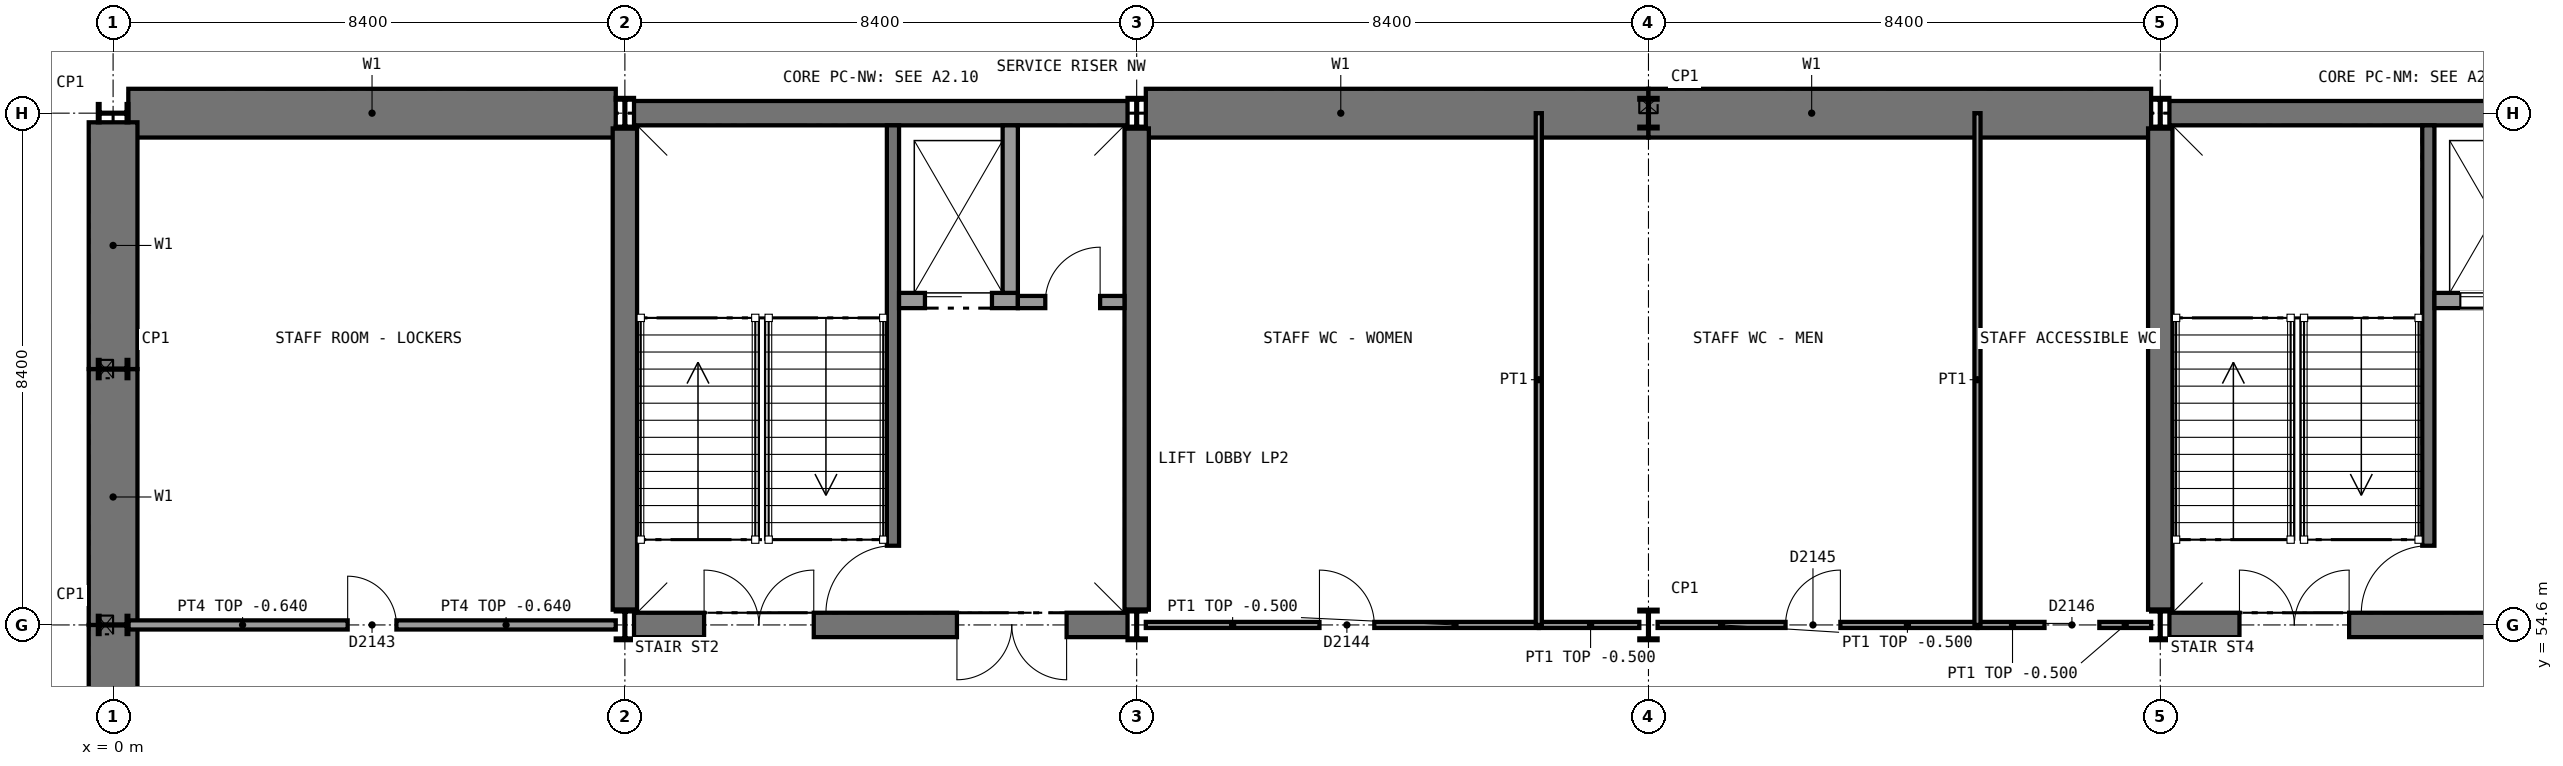
"""IFC4 building model, lengths in metres.
Left out: names, types, materials, properties, quantities, classifications, styles, units other than length and angle.
Written with IfcOpenShell. Run it as: python <this file> out.ifc"""

import sys

from ifc_helpers import new_model, si_unit, direction, frame, frame_2d, origin, origin_2d, place, context, subcontext, project, spatial, rectangle, i_section, extrude, element, fill, save


model = new_model("IFC4")
c1 = context("Model", 3, precision=1e-05, world=origin(), true_north=direction((0.0, 1.0)))
c2 = subcontext(c1, "Body", "Model", "MODEL_VIEW")
j1 = project(units=[si_unit("LENGTHUNIT", "METRE"), si_unit("PLANEANGLEUNIT", "RADIAN")], contexts=[c1])
p1 = place(None, origin())
s1 = spatial("IfcSite", under=j1, at=p1, CompositionType="ELEMENT")
p2 = place(p1, origin())
s2 = spatial("IfcBuilding", under=s1, at=p2, CompositionType="ELEMENT")
p3 = place(p2, frame((0.0, 0.0, -4.9)))
s3 = spatial("IfcBuildingStorey", under=s2, at=p3, CompositionType="ELEMENT", Elevation=-4.9)
p4 = place(p3, frame((0.25, 63.0, 0.0), z_axis=(0.0, 0.0, 1.0), x_axis=(1.0, 0.0, 0.0)))
e1 = element("IfcWall", 1, at=p4, inside=s3, PredefinedType="SOLIDWALL", context=c2, shape_type="SweptSolid", body=[
    extrude(rectangle(XDim=8.0, YDim=0.8, at=frame_2d((4.0, 0.0))), origin(), (0.0, 0.0, 1.0), 4.75),
])
p5 = place(p3, frame((16.95, 63.0, 0.0), z_axis=(0.0, 0.0, 1.0), x_axis=(1.0, 0.0, 0.0)))
e2 = element("IfcWall", 2, at=p5, inside=s3, PredefinedType="SOLIDWALL", context=c2, shape_type="SweptSolid", body=[
    extrude(rectangle(XDim=8.25, YDim=0.8, at=frame_2d((4.125, 0.0))), origin(), (0.0, 0.0, 1.0), 4.75),
])
p6 = place(p3, frame((25.2, 63.0, 0.0), z_axis=(0.0, 0.0, 1.0), x_axis=(1.0, 0.0, 0.0)))
e3 = element("IfcWall", 3, at=p6, inside=s3, PredefinedType="SOLIDWALL", context=c2, shape_type="SweptSolid", body=[
    extrude(rectangle(XDim=8.25, YDim=0.8, at=frame_2d((4.125, 0.0))), origin(), (0.0, 0.0, 1.0), 4.75),
])
p7 = place(p3, frame((0.0, 50.4, 0.0), z_axis=(0.0, 0.0, 1.0), x_axis=(0.0, 1.0, 0.0)))
e4 = element("IfcWall", 4, at=p7, inside=s3, PredefinedType="SOLIDWALL", context=c2, shape_type="SweptSolid", body=[
    extrude(rectangle(XDim=4.2, YDim=0.8, at=frame_2d((2.1, 0.0))), origin(), (0.0, 0.0, 1.0), 4.75),
])
p8 = place(p3, frame((0.0, 54.6, 0.0), z_axis=(0.0, 0.0, 1.0), x_axis=(0.0, 1.0, 0.0)))
e5 = element("IfcWall", 5, at=p8, inside=s3, PredefinedType="SOLIDWALL", context=c2, shape_type="SweptSolid", body=[
    extrude(rectangle(XDim=4.2, YDim=0.8, at=frame_2d((2.1, 0.0))), origin(), (0.0, 0.0, 1.0), 4.75),
])
p9 = place(p3, frame((0.0, 58.8, 0.0), z_axis=(0.0, 0.0, 1.0), x_axis=(0.0, 1.0, 0.0)))
e6 = element("IfcWall", 6, at=p9, inside=s3, PredefinedType="SOLIDWALL", context=c2, shape_type="SweptSolid", body=[
    extrude(rectangle(XDim=4.05, YDim=0.8, at=frame_2d((2.025, 0.0))), origin(), (0.0, 0.0, 1.0), 4.75),
])
p10 = place(p3, frame((8.55, 63.0, 0.0), z_axis=(0.0, 0.0, 1.0), x_axis=(1.0, 0.0, 0.0)))
e7 = element("IfcWall", 7, at=p10, inside=s3, PredefinedType="SHEAR", context=c2, shape_type="SweptSolid", body=[
    extrude(rectangle(XDim=8.1, YDim=0.4, at=frame_2d((4.05, 0.0))), origin(), (0.0, 0.0, 1.0), 4.75),
])
p11 = place(p3, frame((8.55, 54.6, 0.0), z_axis=(0.0, 0.0, 1.0), x_axis=(1.0, 0.0, 0.0)))
e8 = element("IfcWall", 8, at=p11, inside=s3, PredefinedType="SHEAR", context=c2, shape_type="SweptSolid", body=[
    extrude(rectangle(XDim=8.1, YDim=0.4, at=frame_2d((4.05, 0.0))), origin(), (0.0, 0.0, 1.0), 4.75),
])
p12 = place(p11, frame((1.15, 0.0, 0.0)))
e9 = element("IfcOpeningElement", 9, at=p12, cuts=e8, PredefinedType="OPENING", context=c2, shape_type="SweptSolid", body=[
    extrude(rectangle(XDim=1.8, YDim=2.1, at=frame_2d((0.9, 1.05))), frame((0.0, 0.21, 0.0), z_axis=(0.0, -1.0, 0.0), x_axis=(1.0, 0.0, 0.0)), (0.0, 0.0, 1.0), 0.42),
])
p13 = place(p11, frame((5.3, 0.0, 0.0)))
e10 = element("IfcOpeningElement", 10, at=p13, cuts=e8, PredefinedType="OPENING", context=c2, shape_type="SweptSolid", body=[
    extrude(rectangle(XDim=1.8, YDim=2.1, at=frame_2d((0.9, 1.05))), frame((0.0, 0.21, 0.0), z_axis=(0.0, -1.0, 0.0), x_axis=(1.0, 0.0, 0.0)), (0.0, 0.0, 1.0), 0.42),
])
for number, where, z_axis, x_axis in (
    (11, (8.4, 54.85, 0.0), (0.0, 0.0, 1.0), (0.0, 1.0, 0.0)),
    (12, (16.8, 54.85, 0.0), (0.0, 0.0, 1.0), (0.0, 1.0, 0.0)),
):
    element("IfcWall", number, at=place(p3, frame(where, z_axis=z_axis, x_axis=x_axis)), inside=s3, PredefinedType="SHEAR", context=c2, shape_type="SweptSolid", body=[
        extrude(rectangle(XDim=7.9, YDim=0.4, at=frame_2d((3.95, 0.0))), origin(), (0.0, 0.0, 1.0), 4.75),
    ])
p14 = place(p3, frame((33.75, 63.0, 0.0), z_axis=(0.0, 0.0, 1.0), x_axis=(1.0, 0.0, 0.0)))
e13 = element("IfcWall", 13, at=p14, inside=s3, PredefinedType="SHEAR", context=c2, shape_type="SweptSolid", body=[
    extrude(rectangle(XDim=8.1, YDim=0.4, at=frame_2d((4.05, 0.0))), origin(), (0.0, 0.0, 1.0), 4.75),
])
p15 = place(p3, frame((33.75, 54.6, 0.0), z_axis=(0.0, 0.0, 1.0), x_axis=(1.0, 0.0, 0.0)))
e14 = element("IfcWall", 14, at=p15, inside=s3, PredefinedType="SHEAR", context=c2, shape_type="SweptSolid", body=[
    extrude(rectangle(XDim=8.1, YDim=0.4, at=frame_2d((4.05, 0.0))), origin(), (0.0, 0.0, 1.0), 4.75),
])
p16 = place(p15, frame((1.15, 0.0, 0.0)))
e15 = element("IfcOpeningElement", 15, at=p16, cuts=e14, PredefinedType="OPENING", context=c2, shape_type="SweptSolid", body=[
    extrude(rectangle(XDim=1.8, YDim=2.1, at=frame_2d((0.9, 1.05))), frame((0.0, 0.21, 0.0), z_axis=(0.0, -1.0, 0.0), x_axis=(1.0, 0.0, 0.0)), (0.0, 0.0, 1.0), 0.42),
])
p17 = place(p15, frame((5.3, 0.0, 0.0)))
e16 = element("IfcOpeningElement", 16, at=p17, cuts=e14, PredefinedType="OPENING", context=c2, shape_type="SweptSolid", body=[
    extrude(rectangle(XDim=1.8, YDim=2.1, at=frame_2d((0.9, 1.05))), frame((0.0, 0.21, 0.0), z_axis=(0.0, -1.0, 0.0), x_axis=(1.0, 0.0, 0.0)), (0.0, 0.0, 1.0), 0.42),
])
p18 = place(p3, frame((33.6, 54.85, 0.0), z_axis=(0.0, 0.0, 1.0), x_axis=(0.0, 1.0, 0.0)))
e17 = element("IfcWall", 17, at=p18, inside=s3, PredefinedType="SHEAR", context=c2, shape_type="SweptSolid", body=[
    extrude(rectangle(XDim=7.9, YDim=0.4, at=frame_2d((3.95, 0.0))), origin(), (0.0, 0.0, 1.0), 4.75),
])
for number, where, z_axis, x_axis in (
    (18, (0.0, 54.6, 0.0), (0.0, 0.0, 1.0), (0.0, 1.0, 0.0)),
    (19, (0.0, 58.8, 0.0), (0.0, 0.0, 1.0), (0.0, 1.0, 0.0)),
    (20, (0.0, 63.0, 0.0), (0.0, 0.0, 1.0), (0.0, 1.0, 0.0)),
    (21, (8.4, 54.6, 0.0), (0.0, 0.0, 1.0), (1.0, 0.0, 0.0)),
    (22, (8.4, 63.0, 0.0), (0.0, 0.0, 1.0), (1.0, 0.0, 0.0)),
    (23, (16.8, 54.6, 0.0), (0.0, 0.0, 1.0), (1.0, 0.0, 0.0)),
    (24, (16.8, 63.0, 0.0), (0.0, 0.0, 1.0), (1.0, 0.0, 0.0)),
    (25, (25.2, 54.6, 0.0), (0.0, 0.0, 1.0), (1.0, 0.0, 0.0)),
    (26, (25.2, 63.0, 0.0), (0.0, 0.0, 1.0), (1.0, 0.0, 0.0)),
    (27, (33.6, 54.6, 0.0), (0.0, 0.0, 1.0), (1.0, 0.0, 0.0)),
    (28, (33.6, 63.0, 0.0), (0.0, 0.0, 1.0), (1.0, 0.0, 0.0)),
):
    element("IfcColumn", number, at=place(p3, frame(where, z_axis=z_axis, x_axis=x_axis)), inside=s3, PredefinedType="COLUMN", context=c2, shape_type="SweptSolid", body=[
        extrude(i_section(OverallWidth=0.3, OverallDepth=0.5, WebThickness=0.014, FlangeThickness=0.028, FilletRadius=0.027, at=origin_2d()), origin(), (0.0, 0.0, 1.0), 4.9),
    ])
p19 = place(p3, frame((0.25, 54.6, 0.0), z_axis=(0.0, 0.0, 1.0), x_axis=(1.0, 0.0, 0.0)))
e29 = element("IfcWall", 29, at=p19, inside=s3, PredefinedType="SOLIDWALL", context=c2, shape_type="SweptSolid", body=[
    extrude(rectangle(XDim=8.0, YDim=0.15, at=frame_2d((4.0, 0.0))), origin(), (0.0, 0.0, 1.0), 4.26),
])
p20 = place(p19, frame((3.6, 0.0, 0.0)))
e30 = element("IfcOpeningElement", 30, at=p20, cuts=e29, PredefinedType="OPENING", context=c2, shape_type="SweptSolid", body=[
    extrude(rectangle(XDim=0.8, YDim=2.1, at=frame_2d((0.4, 1.05))), frame((0.0, 0.085, 0.0), z_axis=(0.0, -1.0, 0.0), x_axis=(1.0, 0.0, 0.0)), (0.0, 0.0, 1.0), 0.17),
])
p21 = place(p3, frame((16.95, 54.6, 0.0), z_axis=(0.0, 0.0, 1.0), x_axis=(1.0, 0.0, 0.0)))
e31 = element("IfcWall", 31, at=p21, inside=s3, PredefinedType="PARTITIONING", context=c2, shape_type="SweptSolid", body=[
    extrude(rectangle(XDim=6.45, YDim=0.1, at=frame_2d((3.225, 0.0))), origin(), (0.0, 0.0, 1.0), 4.4),
])
p22 = place(p21, frame((2.85, 0.0, 0.0)))
e32 = element("IfcOpeningElement", 32, at=p22, cuts=e31, PredefinedType="OPENING", context=c2, shape_type="SweptSolid", body=[
    extrude(rectangle(XDim=0.9, YDim=2.1, at=frame_2d((0.45, 1.05))), frame((0.0, 0.06, 0.0), z_axis=(0.0, -1.0, 0.0), x_axis=(1.0, 0.0, 0.0)), (0.0, 0.0, 1.0), 0.12),
])
p23 = place(p3, frame((23.4, 54.6, 0.0), z_axis=(0.0, 0.0, 1.0), x_axis=(1.0, 0.0, 0.0)))
e33 = element("IfcWall", 33, at=p23, inside=s3, PredefinedType="PARTITIONING", context=c2, shape_type="SweptSolid", body=[
    extrude(rectangle(XDim=1.65, YDim=0.1, at=frame_2d((0.825, 0.0))), origin(), (0.0, 0.0, 1.0), 4.4),
])
p24 = place(p3, frame((25.35, 54.6, 0.0), z_axis=(0.0, 0.0, 1.0), x_axis=(1.0, 0.0, 0.0)))
e34 = element("IfcWall", 34, at=p24, inside=s3, PredefinedType="PARTITIONING", context=c2, shape_type="SweptSolid", body=[
    extrude(rectangle(XDim=5.25, YDim=0.1, at=frame_2d((2.625, 0.0))), origin(), (0.0, 0.0, 1.0), 4.4),
])
p25 = place(p24, frame((2.1, 0.0, 0.0)))
e35 = element("IfcOpeningElement", 35, at=p25, cuts=e34, PredefinedType="OPENING", context=c2, shape_type="SweptSolid", body=[
    extrude(rectangle(XDim=0.9, YDim=2.1, at=frame_2d((0.45, 1.05))), frame((0.0, 0.06, 0.0), z_axis=(0.0, -1.0, 0.0), x_axis=(1.0, 0.0, 0.0)), (0.0, 0.0, 1.0), 0.12),
])
p26 = place(p3, frame((30.6, 54.6, 0.0), z_axis=(0.0, 0.0, 1.0), x_axis=(1.0, 0.0, 0.0)))
e36 = element("IfcWall", 36, at=p26, inside=s3, PredefinedType="PARTITIONING", context=c2, shape_type="SweptSolid", body=[
    extrude(rectangle(XDim=2.85, YDim=0.1, at=frame_2d((1.425, 0.0))), origin(), (0.0, 0.0, 1.0), 4.4),
])
p27 = place(p26, frame((1.1, 0.0, 0.0)))
e37 = element("IfcOpeningElement", 37, at=p27, cuts=e36, PredefinedType="OPENING", context=c2, shape_type="SweptSolid", body=[
    extrude(rectangle(XDim=0.9, YDim=2.1, at=frame_2d((0.45, 1.05))), frame((0.0, 0.06, 0.0), z_axis=(0.0, -1.0, 0.0), x_axis=(1.0, 0.0, 0.0)), (0.0, 0.0, 1.0), 0.12),
])
for number, where, z_axis, x_axis in (
    (38, (23.4, 54.6, 0.0), (0.0, 0.0, 1.0), (0.0, 1.0, 0.0)),
    (39, (30.6, 54.6, 0.0), (0.0, 0.0, 1.0), (0.0, 1.0, 0.0)),
):
    element("IfcWall", number, at=place(p3, frame(where, z_axis=z_axis, x_axis=x_axis)), inside=s3, PredefinedType="PARTITIONING", context=c2, shape_type="SweptSolid", body=[
        extrude(rectangle(XDim=8.4, YDim=0.1, at=frame_2d((4.2, 0.0))), origin(), (0.0, 0.0, 1.0), 4.75),
    ])
p28 = place(p3, frame((12.8, 62.8, 0.0), z_axis=(0.0, 0.0, 1.0), x_axis=(0.0, -1.0, 0.0)))
e40 = element("IfcWall", 40, at=p28, inside=s3, PredefinedType="SHEAR", context=c2, shape_type="SweptSolid", body=[
    extrude(rectangle(XDim=8.0, YDim=0.2, at=frame_2d((4.0, 0.0))), origin(), (0.0, 0.0, 1.0), 4.75),
])
p29 = place(p28, frame((6.9, 0.0, 0.0)))
e41 = element("IfcOpeningElement", 41, at=p29, cuts=e40, PredefinedType="OPENING", context=c2, shape_type="SweptSolid", body=[
    extrude(rectangle(XDim=1.11, YDim=2.1, at=frame_2d((0.555, 1.05))), frame((0.0, 0.11, 0.0), z_axis=(0.0, -1.0, 0.0), x_axis=(1.0, 0.0, 0.0)), (0.0, 0.0, 1.0), 0.22),
])
p30 = place(p3, frame((12.9, 59.925, 0.0), z_axis=(0.0, 0.0, 1.0), x_axis=(1.0, 0.0, 0.0)))
e42 = element("IfcWall", 42, at=p30, inside=s3, PredefinedType="SOLIDWALL", context=c2, shape_type="SweptSolid", body=[
    extrude(rectangle(XDim=1.95, YDim=0.25, at=frame_2d((0.975, 0.0))), origin(), (0.0, 0.0, 1.0), 4.9),
])
p31 = place(p30, frame((0.425, 0.0, 0.0)))
e43 = element("IfcOpeningElement", 43, at=p31, cuts=e42, PredefinedType="OPENING", context=c2, shape_type="SweptSolid", body=[
    extrude(rectangle(XDim=1.1, YDim=2.1, at=frame_2d((0.55, 1.05))), frame((0.0, 0.135, 0.0), z_axis=(0.0, -1.0, 0.0), x_axis=(1.0, 0.0, 0.0)), (0.0, 0.0, 1.0), 0.27),
])
p32 = place(p3, frame((14.725, 62.8, 0.0), z_axis=(0.0, 0.0, 1.0), x_axis=(0.0, -1.0, 0.0)))
e44 = element("IfcWall", 44, at=p32, inside=s3, PredefinedType="SOLIDWALL", context=c2, shape_type="SweptSolid", body=[
    extrude(rectangle(XDim=2.75, YDim=0.25, at=frame_2d((1.375, 0.0))), origin(), (0.0, 0.0, 1.0), 4.9),
])
p33 = place(p3, frame((14.85, 59.9, 0.0), z_axis=(0.0, 0.0, 1.0), x_axis=(1.0, 0.0, 0.0)))
e45 = element("IfcWall", 45, at=p33, inside=s3, PredefinedType="PARTITIONING", context=c2, shape_type="SweptSolid", body=[
    extrude(rectangle(XDim=1.75, YDim=0.2, at=frame_2d((0.875, 0.0))), origin(), (0.0, 0.0, 1.0), 4.75),
])
p34 = place(p33, frame((0.45, 0.0, 0.0)))
e46 = element("IfcOpeningElement", 46, at=p34, cuts=e45, PredefinedType="OPENING", context=c2, shape_type="SweptSolid", body=[
    extrude(rectangle(XDim=0.9, YDim=2.1, at=frame_2d((0.45, 1.05))), frame((0.0, 0.11, 0.0), z_axis=(0.0, -1.0, 0.0), x_axis=(1.0, 0.0, 0.0)), (0.0, 0.0, 1.0), 0.22),
])
p35 = place(p3, frame((38.0, 62.8, 0.0), z_axis=(0.0, 0.0, 1.0), x_axis=(0.0, -1.0, 0.0)))
e47 = element("IfcWall", 47, at=p35, inside=s3, PredefinedType="SHEAR", context=c2, shape_type="SweptSolid", body=[
    extrude(rectangle(XDim=8.0, YDim=0.2, at=frame_2d((4.0, 0.0))), origin(), (0.0, 0.0, 1.0), 4.75),
])
p36 = place(p35, frame((6.9, 0.0, 0.0)))
e48 = element("IfcOpeningElement", 48, at=p36, cuts=e47, PredefinedType="OPENING", context=c2, shape_type="SweptSolid", body=[
    extrude(rectangle(XDim=1.11, YDim=2.1, at=frame_2d((0.555, 1.05))), frame((0.0, 0.11, 0.0), z_axis=(0.0, -1.0, 0.0), x_axis=(1.0, 0.0, 0.0)), (0.0, 0.0, 1.0), 0.22),
])
p37 = place(p3, frame((38.1, 59.925, 0.0), z_axis=(0.0, 0.0, 1.0), x_axis=(1.0, 0.0, 0.0)))
e49 = element("IfcWall", 49, at=p37, inside=s3, PredefinedType="SOLIDWALL", context=c2, shape_type="SweptSolid", body=[
    extrude(rectangle(XDim=1.95, YDim=0.25, at=frame_2d((0.975, 0.0))), origin(), (0.0, 0.0, 1.0), 4.9),
])
p38 = place(p37, frame((0.425, 0.0, 0.0)))
e50 = element("IfcOpeningElement", 50, at=p38, cuts=e49, PredefinedType="OPENING", context=c2, shape_type="SweptSolid", body=[
    extrude(rectangle(XDim=1.1, YDim=2.1, at=frame_2d((0.55, 1.05))), frame((0.0, 0.135, 0.0), z_axis=(0.0, -1.0, 0.0), x_axis=(1.0, 0.0, 0.0)), (0.0, 0.0, 1.0), 0.27),
])
p39 = place(p20, origin())
e51 = element("IfcDoor", 51, at=p39, inside=s3, OperationType="SINGLE_SWING_LEFT", PredefinedType="DOOR", context=c2, shape_type="SweptSolid", body=[
    extrude(rectangle(XDim=0.8, YDim=2.1, at=frame_2d((0.4, 1.05))), frame((0.0, 0.025, 0.0), z_axis=(0.0, -1.0, 0.0), x_axis=(1.0, 0.0, 0.0)), (0.0, 0.0, 1.0), 0.05),
])
fill(e30, e51)
p40 = place(p22, origin())
e52 = element("IfcDoor", 52, at=p40, inside=s3, OperationType="SINGLE_SWING_LEFT", PredefinedType="DOOR", context=c2, shape_type="SweptSolid", body=[
    extrude(rectangle(XDim=0.9, YDim=2.1, at=frame_2d((0.45, 1.05))), frame((0.0, 0.025, 0.0), z_axis=(0.0, -1.0, 0.0), x_axis=(1.0, 0.0, 0.0)), (0.0, 0.0, 1.0), 0.05),
])
fill(e32, e52)
p41 = place(p25, origin())
e53 = element("IfcDoor", 53, at=p41, inside=s3, OperationType="SINGLE_SWING_RIGHT", PredefinedType="DOOR", context=c2, shape_type="SweptSolid", body=[
    extrude(rectangle(XDim=0.9, YDim=2.1, at=frame_2d((0.45, 1.05))), frame((0.0, 0.025, 0.0), z_axis=(0.0, -1.0, 0.0), x_axis=(1.0, 0.0, 0.0)), (0.0, 0.0, 1.0), 0.05),
])
fill(e35, e53)
p42 = place(p27, frame((0.9, 0.0, 0.0), z_axis=(0.0, 0.0, 1.0), x_axis=(-1.0, 0.0, 0.0)))
e54 = element("IfcDoor", 54, at=p42, inside=s3, OperationType="SLIDING_TO_RIGHT", PredefinedType="DOOR", context=c2, shape_type="SweptSolid", body=[
    extrude(rectangle(XDim=0.9, YDim=2.1, at=frame_2d((0.45, 1.05))), frame((0.0, 0.025, 0.0), z_axis=(0.0, -1.0, 0.0), x_axis=(1.0, 0.0, 0.0)), (0.0, 0.0, 1.0), 0.05),
])
fill(e37, e54)
p43 = place(p29, frame((1.1, 0.0, 0.0), z_axis=(0.0, 0.0, 1.0), x_axis=(-1.0, 0.0, 0.0)))
e55 = element("IfcDoor", 55, at=p43, inside=s3, OperationType="SINGLE_SWING_LEFT", PredefinedType="DOOR", context=c2, shape_type="SweptSolid", body=[
    extrude(rectangle(XDim=1.1, YDim=2.1, at=frame_2d((0.55, 1.05))), frame((0.0, 0.025, 0.0), z_axis=(0.0, -1.0, 0.0), x_axis=(1.0, 0.0, 0.0)), (0.0, 0.0, 1.0), 0.05),
])
fill(e41, e55)
p44 = place(p31, frame((1.1, 0.0, 0.0), z_axis=(0.0, 0.0, 1.0), x_axis=(-1.0, 0.0, 0.0)))
e56 = element("IfcDoor", 56, at=p44, inside=s3, OperationType="SLIDING_TO_RIGHT", PredefinedType="DOOR", context=c2, shape_type="SweptSolid", body=[
    extrude(rectangle(XDim=1.1, YDim=2.1, at=frame_2d((0.55, 1.05))), frame((0.0, 0.025, 0.0), z_axis=(0.0, -1.0, 0.0), x_axis=(1.0, 0.0, 0.0)), (0.0, 0.0, 1.0), 0.05),
])
fill(e43, e56)
p45 = place(p34, origin())
e57 = element("IfcDoor", 57, at=p45, inside=s3, OperationType="SINGLE_SWING_RIGHT", PredefinedType="DOOR", context=c2, shape_type="SweptSolid", body=[
    extrude(rectangle(XDim=0.9, YDim=2.1, at=frame_2d((0.45, 1.05))), frame((0.0, 0.025, 0.0), z_axis=(0.0, -1.0, 0.0), x_axis=(1.0, 0.0, 0.0)), (0.0, 0.0, 1.0), 0.05),
])
fill(e46, e57)
p46 = place(p12, origin())
e58 = element("IfcDoor", 58, at=p46, inside=s3, OperationType="DOUBLE_DOOR_SINGLE_SWING", PredefinedType="DOOR", context=c2, shape_type="SweptSolid", body=[
    extrude(rectangle(XDim=1.8, YDim=2.1, at=frame_2d((0.9, 1.05))), frame((0.0, 0.025, 0.0), z_axis=(0.0, -1.0, 0.0), x_axis=(1.0, 0.0, 0.0)), (0.0, 0.0, 1.0), 0.05),
])
fill(e9, e58)
p47 = place(p13, frame((1.8, 0.0, 0.0), z_axis=(0.0, 0.0, 1.0), x_axis=(-1.0, 0.0, 0.0)))
e59 = element("IfcDoor", 59, at=p47, inside=s3, OperationType="DOUBLE_DOOR_SINGLE_SWING", PredefinedType="DOOR", context=c2, shape_type="SweptSolid", body=[
    extrude(rectangle(XDim=1.8, YDim=2.1, at=frame_2d((0.9, 1.05))), frame((0.0, 0.025, 0.0), z_axis=(0.0, -1.0, 0.0), x_axis=(1.0, 0.0, 0.0)), (0.0, 0.0, 1.0), 0.05),
])
fill(e10, e59)
p48 = place(p36, frame((1.1, 0.0, 0.0), z_axis=(0.0, 0.0, 1.0), x_axis=(-1.0, 0.0, 0.0)))
e60 = element("IfcDoor", 60, at=p48, inside=s3, OperationType="SINGLE_SWING_LEFT", PredefinedType="DOOR", context=c2, shape_type="SweptSolid", body=[
    extrude(rectangle(XDim=1.1, YDim=2.1, at=frame_2d((0.55, 1.05))), frame((0.0, 0.025, 0.0), z_axis=(0.0, -1.0, 0.0), x_axis=(1.0, 0.0, 0.0)), (0.0, 0.0, 1.0), 0.05),
])
fill(e48, e60)
p49 = place(p38, frame((1.1, 0.0, 0.0), z_axis=(0.0, 0.0, 1.0), x_axis=(-1.0, 0.0, 0.0)))
e61 = element("IfcDoor", 61, at=p49, inside=s3, OperationType="SLIDING_TO_RIGHT", PredefinedType="DOOR", context=c2, shape_type="SweptSolid", body=[
    extrude(rectangle(XDim=1.1, YDim=2.1, at=frame_2d((0.55, 1.05))), frame((0.0, 0.025, 0.0), z_axis=(0.0, -1.0, 0.0), x_axis=(1.0, 0.0, 0.0)), (0.0, 0.0, 1.0), 0.05),
])
fill(e50, e61)
p50 = place(p16, origin())
e62 = element("IfcDoor", 62, at=p50, inside=s3, OperationType="DOUBLE_DOOR_SINGLE_SWING", PredefinedType="DOOR", context=c2, shape_type="SweptSolid", body=[
    extrude(rectangle(XDim=1.8, YDim=2.1, at=frame_2d((0.9, 1.05))), frame((0.0, 0.025, 0.0), z_axis=(0.0, -1.0, 0.0), x_axis=(1.0, 0.0, 0.0)), (0.0, 0.0, 1.0), 0.05),
])
fill(e15, e62)
save(model, sys.argv[1])
